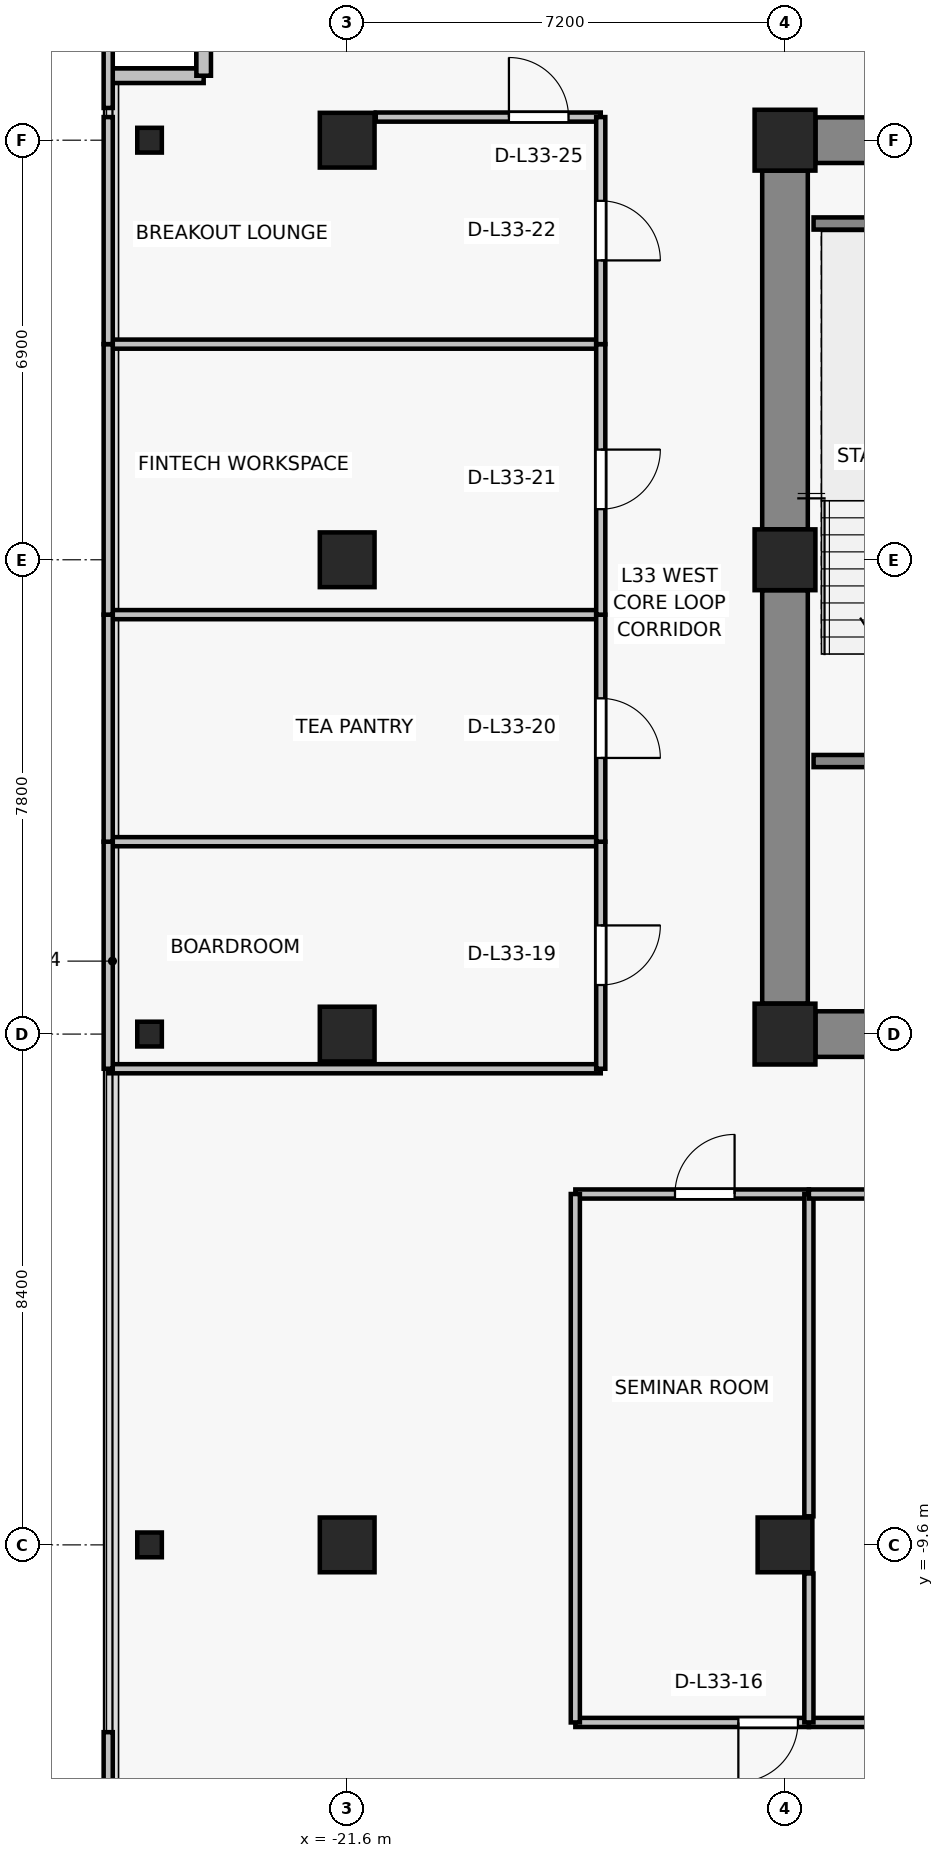
"""IFC4 building model, lengths in metres.
Left out: names, types, materials, properties, quantities, classifications, styles, units other than length and angle.
Written with IfcOpenShell. Run it as: python <this file> out.ifc"""

import sys

from ifc_helpers import new_model, si_unit, direction, frame, frame_2d, origin, origin_2d, place, context, subcontext, project, spatial, rectangle, i_section, extrude, source, transform, mapped, element, fill, save


model = new_model("IFC4")
c1 = context("Model", 3, precision=1e-05, world=origin(), true_north=direction((0.0, 1.0)))
c2 = subcontext(c1, "Body", "Model", "MODEL_VIEW")
j1 = project(units=[si_unit("LENGTHUNIT", "METRE"), si_unit("PLANEANGLEUNIT", "RADIAN")], contexts=[c1])
p1 = place(None, origin())
s1 = spatial("IfcSite", under=j1, at=p1, CompositionType="ELEMENT")
p2 = place(p1, origin())
s2 = spatial("IfcBuilding", under=s1, at=p2, CompositionType="ELEMENT")
p3 = place(p2, frame((0.0, 0.0, 119.8)))
s3 = spatial("IfcBuildingStorey", under=s2, at=p3, CompositionType="ELEMENT", Elevation=119.8)
for number, where, z_axis, x_axis in (
    (1, (-14.4, -1.2, 0.0), (0.0, 0.0, 1.0), (1.0, 0.0, 0.0)),
    (2, (-14.4, 6.6, 0.0), (0.0, 0.0, 1.0), (1.0, 0.0, 0.0)),
    (3, (-14.4, 13.5, 0.0), (0.0, 0.0, 1.0), (1.0, 0.0, 0.0)),
):
    element("IfcColumn", number, at=place(p3, frame(where, z_axis=z_axis, x_axis=x_axis)), inside=s3, PredefinedType="COLUMN", context=c2, shape_type="SweptSolid", body=[
        extrude(rectangle(XDim=1.0, YDim=1.0, at=origin_2d()), origin(), (0.0, 0.0, 1.0), 3.3),
    ])
for number, where, z_axis, x_axis in (
    (4, (-14.4, -9.6, 0.0), (0.0, 0.0, 1.0), (1.0, 0.0, 0.0)),
    (5, (-21.6, -9.6, 0.0), (0.0, 0.0, 1.0), (1.0, 0.0, 0.0)),
    (6, (-21.6, -1.2, 0.0), (0.0, 0.0, 1.0), (1.0, 0.0, 0.0)),
    (7, (-21.6, 6.6, 0.0), (0.0, 0.0, 1.0), (1.0, 0.0, 0.0)),
    (8, (-21.6, 13.5, 0.0), (0.0, 0.0, 1.0), (1.0, 0.0, 0.0)),
):
    element("IfcColumn", number, at=place(p3, frame(where, z_axis=z_axis, x_axis=x_axis)), inside=s3, PredefinedType="COLUMN", context=c2, shape_type="SweptSolid", body=[
        extrude(rectangle(XDim=0.9, YDim=0.9, at=origin_2d()), origin(), (0.0, 0.0, 1.0), 3.3),
    ])
for number, where, z_axis, x_axis in (
    (9, (-24.85, -9.6, 0.0), (0.0, 0.0, 1.0), (1.0, 0.0, 0.0)),
    (10, (-24.85, -1.2, 0.0), (0.0, 0.0, 1.0), (1.0, 0.0, 0.0)),
    (11, (-24.85, 13.5, 0.0), (0.0, 0.0, 1.0), (1.0, 0.0, 0.0)),
):
    element("IfcColumn", number, at=place(p3, frame(where, z_axis=z_axis, x_axis=x_axis)), inside=s3, PredefinedType="COLUMN", context=c2, shape_type="SweptSolid", body=[
        extrude(i_section(OverallWidth=0.404, OverallDepth=0.407, WebThickness=0.022, FlangeThickness=0.032, FilletRadius=0.015, at=origin_2d()), origin(), (0.0, 0.0, 1.0), 3.3),
    ])
p4 = place(p3, frame((-13.9, 13.5, 0.0), z_axis=(0.0, 0.0, 1.0), x_axis=(1.0, 0.0, 0.0)))
e12 = element("IfcWall", 12, at=p4, inside=s3, PredefinedType="SHEAR", context=c2, shape_type="SweptSolid", body=[
    extrude(rectangle(XDim=6.2, YDim=0.75, at=frame_2d((3.1, 0.0))), origin(), (0.0, 0.0, 1.0), 3.075),
])
p5 = place(p3, frame((-14.4, -0.7, 0.0), z_axis=(0.0, 0.0, 1.0), x_axis=(0.0, 1.0, 0.0)))
e13 = element("IfcWall", 13, at=p5, inside=s3, PredefinedType="SHEAR", context=c2, shape_type="SweptSolid", body=[
    extrude(rectangle(XDim=6.8, YDim=0.75, at=frame_2d((3.4, 0.0))), origin(), (0.0, 0.0, 1.0), 3.075),
])
p6 = place(p3, frame((-14.4, 7.1, 0.0), z_axis=(0.0, 0.0, 1.0), x_axis=(0.0, 1.0, 0.0)))
e14 = element("IfcWall", 14, at=p6, inside=s3, PredefinedType="SHEAR", context=c2, shape_type="SweptSolid", body=[
    extrude(rectangle(XDim=5.9, YDim=0.75, at=frame_2d((2.95, 0.0))), origin(), (0.0, 0.0, 1.0), 3.075),
])
p7 = place(p3, frame((-7.7, -1.2, 0.0), z_axis=(0.0, 0.0, 1.0), x_axis=(-1.0, 0.0, 0.0)))
e15 = element("IfcWall", 15, at=p7, inside=s3, PredefinedType="SHEAR", context=c2, shape_type="SweptSolid", body=[
    extrude(rectangle(XDim=6.2, YDim=0.75, at=frame_2d((3.1, 0.0))), origin(), (0.0, 0.0, 1.0), 3.075),
])
p8 = place(p7, frame((2.625, 0.0, 0.0)))
e16 = element("IfcOpeningElement", 16, at=p8, cuts=e15, PredefinedType="OPENING", context=c2, shape_type="SweptSolid", body=[
    extrude(rectangle(XDim=1.15, YDim=2.15, at=frame_2d((0.575, 1.075))), frame((0.0, 0.385, 0.0), z_axis=(0.0, -1.0, 0.0), x_axis=(1.0, 0.0, 0.0)), (0.0, 0.0, 1.0), 0.77),
])
for number, where, z_axis, x_axis in (
    (17, (-23.96, 14.56, 0.0), (0.0, 0.0, 1.0), (-1.0, 0.0, 0.0)),
    (18, (-23.96, 16.06, 0.0), (0.0, 0.0, 1.0), (0.0, -1.0, 0.0)),
):
    element("IfcWall", number, at=place(p3, frame(where, z_axis=z_axis, x_axis=x_axis)), inside=s3, PredefinedType="SOLIDWALL", context=c2, shape_type="SweptSolid", body=[
        extrude(rectangle(XDim=1.5, YDim=0.24, at=frame_2d((0.75, 0.0))), origin(), (0.0, 0.0, 1.0), 3.075),
    ])
p9 = place(p3, frame((-10.41, 3.29, 0.0), z_axis=(0.0, 0.0, 1.0), x_axis=(-1.0, 0.0, 0.0)))
e19 = element("IfcWall", 19, at=p9, inside=s3, PredefinedType="SOLIDWALL", context=c2, shape_type="SweptSolid", body=[
    extrude(rectangle(XDim=3.52, YDim=0.2, at=frame_2d((1.76, 0.0))), origin(), (0.0, 0.0, 1.0), 3.075),
])
p10 = place(p9, frame((1.165, 0.0, 0.0)))
e20 = element("IfcOpeningElement", 20, at=p10, cuts=e19, PredefinedType="OPENING", context=c2, shape_type="SweptSolid", body=[
    extrude(rectangle(XDim=1.15, YDim=2.15, at=frame_2d((0.575, 1.075))), frame((0.0, 0.11, 0.0), z_axis=(0.0, -1.0, 0.0), x_axis=(1.0, 0.0, 0.0)), (0.0, 0.0, 1.0), 0.22),
])
p11 = place(p3, frame((-13.93, 12.13, 0.0), z_axis=(0.0, 0.0, 1.0), x_axis=(1.0, 0.0, 0.0)))
e21 = element("IfcWall", 21, at=p11, inside=s3, PredefinedType="SOLIDWALL", context=c2, shape_type="SweptSolid", body=[
    extrude(rectangle(XDim=3.52, YDim=0.2, at=frame_2d((1.76, 0.0))), origin(), (0.0, 0.0, 1.0), 3.075),
])
p12 = place(p3, frame((-14.007, -12.52, 0.0), z_axis=(0.0, 0.0, 1.0), x_axis=(-1.0, 0.0, 0.0)))
e22 = element("IfcWall", 22, at=p12, inside=s3, PredefinedType="PARTITIONING", context=c2, shape_type="SweptSolid", body=[
    extrude(rectangle(XDim=3.841, YDim=0.15, at=frame_2d((1.92, 0.0))), origin(), (0.0, 0.0, 1.0), 2.515),
])
p13 = place(p12, frame((0.18, 0.0, 0.0)))
e23 = element("IfcOpeningElement", 23, at=p13, cuts=e22, PredefinedType="OPENING", context=c2, shape_type="SweptSolid", body=[
    extrude(rectangle(XDim=0.98, YDim=2.15, at=frame_2d((0.49, 1.075))), frame((0.0, 0.085, 0.0), z_axis=(0.0, -1.0, 0.0), x_axis=(1.0, 0.0, 0.0)), (0.0, 0.0, 1.0), 0.17),
])
p14 = place(p3, frame((-17.848, -3.83, 0.0), z_axis=(0.0, 0.0, 1.0), x_axis=(1.0, 0.0, 0.0)))
e24 = element("IfcWall", 24, at=p14, inside=s3, PredefinedType="PARTITIONING", context=c2, shape_type="SweptSolid", body=[
    extrude(rectangle(XDim=3.841, YDim=0.15, at=frame_2d((1.92, 0.0))), origin(), (0.0, 0.0, 1.0), 2.515),
])
p15 = place(p14, frame((1.639, 0.0, 0.0)))
e25 = element("IfcOpeningElement", 25, at=p15, cuts=e24, PredefinedType="OPENING", context=c2, shape_type="SweptSolid", body=[
    extrude(rectangle(XDim=0.98, YDim=2.15, at=frame_2d((0.49, 1.075))), frame((0.0, 0.085, 0.0), z_axis=(0.0, -1.0, 0.0), x_axis=(1.0, 0.0, 0.0)), (0.0, 0.0, 1.0), 0.17),
])
p16 = place(p3, frame((-17.848, -12.52, 0.0), z_axis=(0.0, 0.0, 1.0), x_axis=(0.0, 1.0, 0.0)))
e26 = element("IfcWall", 26, at=p16, inside=s3, PredefinedType="PARTITIONING", context=c2, shape_type="SweptSolid", body=[
    extrude(rectangle(XDim=8.69, YDim=0.15, at=frame_2d((4.345, 0.0))), origin(), (0.0, 0.0, 1.0), 2.515),
])
p17 = place(p3, frame((-14.007, -3.83, 0.0), z_axis=(0.0, 0.0, 1.0), x_axis=(0.0, -1.0, 0.0)))
e27 = element("IfcWall", 27, at=p17, inside=s3, PredefinedType="PARTITIONING", context=c2, shape_type="SweptSolid", body=[
    extrude(rectangle(XDim=5.3, YDim=0.15, at=frame_2d((2.65, 0.0))), origin(), (0.0, 0.0, 1.0), 2.615),
])
p18 = place(p3, frame((-9.43, -12.52, 0.0), z_axis=(0.0, 0.0, 1.0), x_axis=(-1.0, 0.0, 0.0)))
e28 = element("IfcWall", 28, at=p18, inside=s3, PredefinedType="PARTITIONING", context=c2, shape_type="SweptSolid", body=[
    extrude(rectangle(XDim=4.577, YDim=0.15, at=frame_2d((2.289, 0.0))), origin(), (0.0, 0.0, 1.0), 2.665),
])
p19 = place(p3, frame((-14.007, -3.83, 0.0), z_axis=(0.0, 0.0, 1.0), x_axis=(1.0, 0.0, 0.0)))
e29 = element("IfcWall", 29, at=p19, inside=s3, PredefinedType="PARTITIONING", context=c2, shape_type="SweptSolid", body=[
    extrude(rectangle(XDim=4.577, YDim=0.15, at=frame_2d((2.289, 0.0))), origin(), (0.0, 0.0, 1.0), 3.075),
])
p20 = place(p19, frame((1.799, 0.0, 0.0)))
e30 = element("IfcOpeningElement", 30, at=p20, cuts=e29, PredefinedType="OPENING", context=c2, shape_type="SweptSolid", body=[
    extrude(rectangle(XDim=0.98, YDim=2.15, at=frame_2d((0.49, 1.075))), frame((0.0, 0.085, 0.0), z_axis=(0.0, -1.0, 0.0), x_axis=(1.0, 0.0, 0.0)), (0.0, 0.0, 1.0), 0.17),
])
p21 = place(p3, frame((-14.007, -12.52, 0.0), z_axis=(0.0, 0.0, 1.0), x_axis=(0.0, 1.0, 0.0)))
e31 = element("IfcWall", 31, at=p21, inside=s3, PredefinedType="PARTITIONING", context=c2, shape_type="SweptSolid", body=[
    extrude(rectangle(XDim=2.45, YDim=0.15, at=frame_2d((1.225, 0.0))), origin(), (0.0, 0.0, 1.0), 3.075),
])
p22 = place(p3, frame((-25.53, -17.63, 0.0), z_axis=(0.0, 0.0, 1.0), x_axis=(0.0, 1.0, 0.0)))
e32 = element("IfcWall", 32, at=p22, inside=s3, PredefinedType="PARTITIONING", context=c2, shape_type="SweptSolid", body=[
    extrude(rectangle(XDim=4.95, YDim=0.15, at=frame_2d((2.475, 0.0))), origin(), (0.0, 0.0, 1.0), 3.075),
])
for number, where, z_axis, x_axis in (
    (33, (-17.43, -1.77, 0.0), (0.0, 0.0, 1.0), (-1.0, 0.0, 0.0)),
    (34, (-25.53, 1.964, 0.0), (0.0, 0.0, 1.0), (1.0, 0.0, 0.0)),
):
    element("IfcWall", number, at=place(p3, frame(where, z_axis=z_axis, x_axis=x_axis)), inside=s3, PredefinedType="PARTITIONING", context=c2, shape_type="SweptSolid", body=[
        extrude(rectangle(XDim=8.1, YDim=0.15, at=frame_2d((4.05, 0.0))), origin(), (0.0, 0.0, 1.0), 2.515),
    ])
p23 = place(p3, frame((-25.53, -1.77, 0.0), z_axis=(0.0, 0.0, 1.0), x_axis=(0.0, 1.0, 0.0)))
e35 = element("IfcWall", 35, at=p23, inside=s3, PredefinedType="PARTITIONING", context=c2, shape_type="SweptSolid", body=[
    extrude(rectangle(XDim=3.734, YDim=0.15, at=frame_2d((1.867, 0.0))), origin(), (0.0, 0.0, 1.0), 3.075),
])
p24 = place(p3, frame((-17.43, 1.964, 0.0), z_axis=(0.0, 0.0, 1.0), x_axis=(0.0, -1.0, 0.0)))
e36 = element("IfcWall", 36, at=p24, inside=s3, PredefinedType="PARTITIONING", context=c2, shape_type="SweptSolid", body=[
    extrude(rectangle(XDim=3.734, YDim=0.15, at=frame_2d((1.867, 0.0))), origin(), (0.0, 0.0, 1.0), 2.515),
])
p25 = place(p24, frame((1.377, 0.0, 0.0)))
e37 = element("IfcOpeningElement", 37, at=p25, cuts=e36, PredefinedType="OPENING", context=c2, shape_type="SweptSolid", body=[
    extrude(rectangle(XDim=0.98, YDim=2.15, at=frame_2d((0.49, 1.075))), frame((0.0, 0.085, 0.0), z_axis=(0.0, -1.0, 0.0), x_axis=(1.0, 0.0, 0.0)), (0.0, 0.0, 1.0), 0.17),
])
p26 = place(p3, frame((-25.53, 5.698, 0.0), z_axis=(0.0, 0.0, 1.0), x_axis=(1.0, 0.0, 0.0)))
e38 = element("IfcWall", 38, at=p26, inside=s3, PredefinedType="PARTITIONING", context=c2, shape_type="SweptSolid", body=[
    extrude(rectangle(XDim=8.1, YDim=0.15, at=frame_2d((4.05, 0.0))), origin(), (0.0, 0.0, 1.0), 2.515),
])
p27 = place(p3, frame((-25.53, 1.964, 0.0), z_axis=(0.0, 0.0, 1.0), x_axis=(0.0, 1.0, 0.0)))
e39 = element("IfcWall", 39, at=p27, inside=s3, PredefinedType="PARTITIONING", context=c2, shape_type="SweptSolid", body=[
    extrude(rectangle(XDim=3.734, YDim=0.15, at=frame_2d((1.867, 0.0))), origin(), (0.0, 0.0, 1.0), 3.075),
])
p28 = place(p3, frame((-17.43, 5.698, 0.0), z_axis=(0.0, 0.0, 1.0), x_axis=(0.0, -1.0, 0.0)))
e40 = element("IfcWall", 40, at=p28, inside=s3, PredefinedType="PARTITIONING", context=c2, shape_type="SweptSolid", body=[
    extrude(rectangle(XDim=3.734, YDim=0.15, at=frame_2d((1.867, 0.0))), origin(), (0.0, 0.0, 1.0), 3.075),
])
p29 = place(p28, frame((1.377, 0.0, 0.0)))
e41 = element("IfcOpeningElement", 41, at=p29, cuts=e40, PredefinedType="OPENING", context=c2, shape_type="SweptSolid", body=[
    extrude(rectangle(XDim=0.98, YDim=2.15, at=frame_2d((0.49, 1.075))), frame((0.0, 0.085, 0.0), z_axis=(0.0, -1.0, 0.0), x_axis=(1.0, 0.0, 0.0)), (0.0, 0.0, 1.0), 0.17),
])
p30 = place(p3, frame((-25.53, 10.146, 0.0), z_axis=(0.0, 0.0, 1.0), x_axis=(1.0, 0.0, 0.0)))
e42 = element("IfcWall", 42, at=p30, inside=s3, PredefinedType="PARTITIONING", context=c2, shape_type="SweptSolid", body=[
    extrude(rectangle(XDim=8.1, YDim=0.15, at=frame_2d((4.05, 0.0))), origin(), (0.0, 0.0, 1.0), 2.515),
])
p31 = place(p3, frame((-25.53, 5.698, 0.0), z_axis=(0.0, 0.0, 1.0), x_axis=(0.0, 1.0, 0.0)))
e43 = element("IfcWall", 43, at=p31, inside=s3, PredefinedType="PARTITIONING", context=c2, shape_type="SweptSolid", body=[
    extrude(rectangle(XDim=4.449, YDim=0.15, at=frame_2d((2.224, 0.0))), origin(), (0.0, 0.0, 1.0), 3.075),
])
p32 = place(p3, frame((-17.43, 10.146, 0.0), z_axis=(0.0, 0.0, 1.0), x_axis=(0.0, -1.0, 0.0)))
e44 = element("IfcWall", 44, at=p32, inside=s3, PredefinedType="PARTITIONING", context=c2, shape_type="SweptSolid", body=[
    extrude(rectangle(XDim=4.449, YDim=0.15, at=frame_2d((2.224, 0.0))), origin(), (0.0, 0.0, 1.0), 2.515),
])
p33 = place(p32, frame((1.734, 0.0, 0.0)))
e45 = element("IfcOpeningElement", 45, at=p33, cuts=e44, PredefinedType="OPENING", context=c2, shape_type="SweptSolid", body=[
    extrude(rectangle(XDim=0.98, YDim=2.15, at=frame_2d((0.49, 1.075))), frame((0.0, 0.085, 0.0), z_axis=(0.0, -1.0, 0.0), x_axis=(1.0, 0.0, 0.0)), (0.0, 0.0, 1.0), 0.17),
])
p34 = place(p3, frame((-21.13, 13.88, 0.0), z_axis=(0.0, 0.0, 1.0), x_axis=(1.0, 0.0, 0.0)))
e46 = element("IfcWall", 46, at=p34, inside=s3, PredefinedType="PARTITIONING", context=c2, shape_type="SweptSolid", body=[
    extrude(rectangle(XDim=3.7, YDim=0.15, at=frame_2d((1.85, 0.0))), origin(), (0.0, 0.0, 1.0), 3.075),
])
p35 = place(p34, frame((2.19, 0.0, 0.0)))
e47 = element("IfcOpeningElement", 47, at=p35, cuts=e46, PredefinedType="OPENING", context=c2, shape_type="SweptSolid", body=[
    extrude(rectangle(XDim=0.98, YDim=2.15, at=frame_2d((0.49, 1.075))), frame((0.0, 0.085, 0.0), z_axis=(0.0, -1.0, 0.0), x_axis=(1.0, 0.0, 0.0)), (0.0, 0.0, 1.0), 0.17),
])
p36 = place(p3, frame((-25.53, 10.146, 0.0), z_axis=(0.0, 0.0, 1.0), x_axis=(0.0, 1.0, 0.0)))
e48 = element("IfcWall", 48, at=p36, inside=s3, PredefinedType="PARTITIONING", context=c2, shape_type="SweptSolid", body=[
    extrude(rectangle(XDim=3.734, YDim=0.15, at=frame_2d((1.867, 0.0))), origin(), (0.0, 0.0, 1.0), 3.075),
])
p37 = place(p3, frame((-17.43, 13.88, 0.0), z_axis=(0.0, 0.0, 1.0), x_axis=(0.0, -1.0, 0.0)))
e49 = element("IfcWall", 49, at=p37, inside=s3, PredefinedType="PARTITIONING", context=c2, shape_type="SweptSolid", body=[
    extrude(rectangle(XDim=3.734, YDim=0.15, at=frame_2d((1.867, 0.0))), origin(), (0.0, 0.0, 1.0), 2.515),
])
p38 = place(p37, frame((1.377, 0.0, 0.0)))
e50 = element("IfcOpeningElement", 50, at=p38, cuts=e49, PredefinedType="OPENING", context=c2, shape_type="SweptSolid", body=[
    extrude(rectangle(XDim=0.98, YDim=2.15, at=frame_2d((0.49, 1.075))), frame((0.0, 0.085, 0.0), z_axis=(0.0, -1.0, 0.0), x_axis=(1.0, 0.0, 0.0)), (0.0, 0.0, 1.0), 0.17),
])
p39 = place(p3, frame((-25.53, 14.03, 0.0), z_axis=(0.0, 0.0, 1.0), x_axis=(0.0, 1.0, 0.0)))
e51 = element("IfcWall", 51, at=p39, inside=s3, PredefinedType="PARTITIONING", context=c2, shape_type="SweptSolid", body=[
    extrude(rectangle(XDim=3.6, YDim=0.15, at=frame_2d((1.8, 0.0))), origin(), (0.0, 0.0, 1.0), 3.075),
])
m1 = source(origin(), c2, "Body", "SweptSolid", [
    extrude(rectangle(XDim=0.98, YDim=2.15, at=frame_2d((0.49, 1.075))), frame((0.0, 0.025, 0.0), z_axis=(0.0, -1.0, 0.0), x_axis=(1.0, 0.0, 0.0)), (0.0, 0.0, 1.0), 0.05),
])
p40 = place(p15, origin())
e52 = element("IfcDoor", 52, at=p40, inside=s3, OperationType="SINGLE_SWING_RIGHT", PredefinedType="DOOR", context=c2, shape_type="MappedRepresentation", body=[
    mapped(m1, transform((0.0, 0.0, 0.0), x_axis=(1.0, 0.0, 0.0), y_axis=(0.0, 1.0, 0.0), z_axis=(0.0, 0.0, 1.0), scale=1.0)),
])
fill(e25, e52)
p41 = place(p13, origin())
e53 = element("IfcDoor", 53, at=p41, inside=s3, OperationType="SINGLE_SWING_RIGHT", PredefinedType="DOOR", context=c2, shape_type="MappedRepresentation", body=[
    mapped(m1, transform((0.0, 0.0, 0.0), x_axis=(1.0, 0.0, 0.0), y_axis=(0.0, 1.0, 0.0), z_axis=(0.0, 0.0, 1.0), scale=1.0)),
])
fill(e23, e53)
p42 = place(p25, origin())
e54 = element("IfcDoor", 54, at=p42, inside=s3, OperationType="SINGLE_SWING_LEFT", PredefinedType="DOOR", context=c2, shape_type="MappedRepresentation", body=[
    mapped(m1, transform((0.0, 0.0, 0.0), x_axis=(1.0, 0.0, 0.0), y_axis=(0.0, 1.0, 0.0), z_axis=(0.0, 0.0, 1.0), scale=1.0)),
])
fill(e37, e54)
p43 = place(p29, origin())
e55 = element("IfcDoor", 55, at=p43, inside=s3, OperationType="SINGLE_SWING_RIGHT", PredefinedType="DOOR", context=c2, shape_type="MappedRepresentation", body=[
    mapped(m1, transform((0.0, 0.0, 0.0), x_axis=(1.0, 0.0, 0.0), y_axis=(0.0, 1.0, 0.0), z_axis=(0.0, 0.0, 1.0), scale=1.0)),
])
fill(e41, e55)
p44 = place(p33, origin())
e56 = element("IfcDoor", 56, at=p44, inside=s3, OperationType="SINGLE_SWING_LEFT", PredefinedType="DOOR", context=c2, shape_type="MappedRepresentation", body=[
    mapped(m1, transform((0.0, 0.0, 0.0), x_axis=(1.0, 0.0, 0.0), y_axis=(0.0, 1.0, 0.0), z_axis=(0.0, 0.0, 1.0), scale=1.0)),
])
fill(e45, e56)
p45 = place(p38, origin())
e57 = element("IfcDoor", 57, at=p45, inside=s3, OperationType="SINGLE_SWING_RIGHT", PredefinedType="DOOR", context=c2, shape_type="MappedRepresentation", body=[
    mapped(m1, transform((0.0, 0.0, 0.0), x_axis=(1.0, 0.0, 0.0), y_axis=(0.0, 1.0, 0.0), z_axis=(0.0, 0.0, 1.0), scale=1.0)),
])
fill(e50, e57)
p46 = place(p35, origin())
e58 = element("IfcDoor", 58, at=p46, inside=s3, OperationType="SINGLE_SWING_LEFT", PredefinedType="DOOR", context=c2, shape_type="MappedRepresentation", body=[
    mapped(m1, transform((0.0, 0.0, 0.0), x_axis=(1.0, 0.0, 0.0), y_axis=(0.0, 1.0, 0.0), z_axis=(0.0, 0.0, 1.0), scale=1.0)),
])
fill(e47, e58)
save(model, sys.argv[1])
